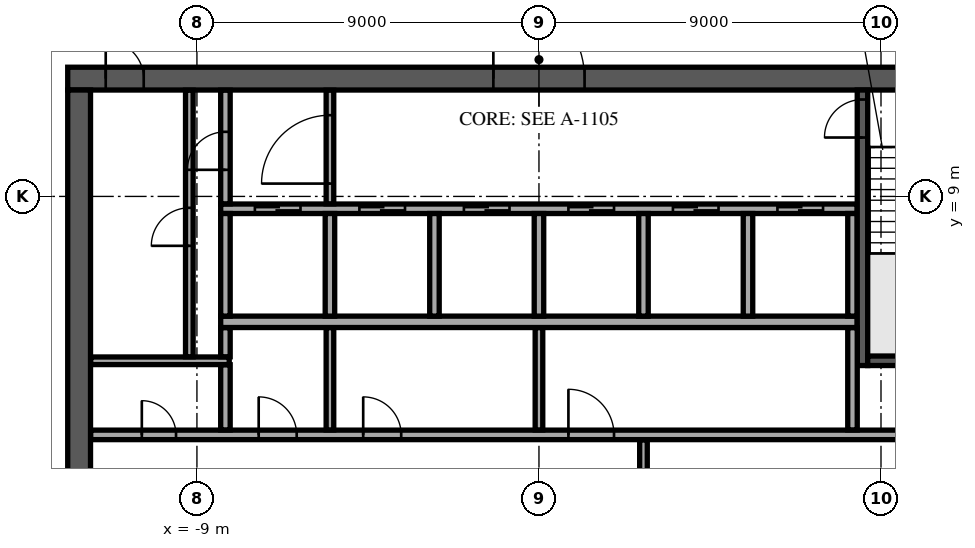
"""IFC4 building model, lengths in metres.
Left out: names, types, materials, properties, quantities, classifications, styles, units other than length and angle.
Written with IfcOpenShell. Run it as: python <this file> out.ifc"""

import sys

from ifc_helpers import new_model, si_unit, direction, frame, frame_2d, origin, place, context, subcontext, project, spatial, rectangle, extrude, element, fill, save


model = new_model("IFC4")
c1 = context("Model", 3, precision=1e-05, world=origin(), true_north=direction((0.0, 1.0)))
c2 = subcontext(c1, "Body", "Model", "MODEL_VIEW")
j1 = project(units=[si_unit("LENGTHUNIT", "METRE"), si_unit("PLANEANGLEUNIT", "RADIAN")], contexts=[c1])
p1 = place(None, origin())
s1 = spatial("IfcSite", under=j1, at=p1, CompositionType="ELEMENT")
p2 = place(p1, origin())
s2 = spatial("IfcBuilding", under=s1, at=p2, CompositionType="ELEMENT")
p3 = place(p2, frame((0.0, 0.0, 316.5)))
s3 = spatial("IfcBuildingStorey", under=s2, at=p3, CompositionType="ELEMENT", Elevation=316.5)
p4 = place(p3, frame((-12.4, 12.1, 0.0), z_axis=(0.0, 0.0, 1.0), x_axis=(1.0, 0.0, 0.0)))
e1 = element("IfcWall", 1, at=p4, inside=s3, PredefinedType="SHEAR", context=c2, shape_type="SweptSolid", body=[
    extrude(rectangle(XDim=24.8, YDim=0.6, at=frame_2d((12.4, 0.0))), origin(), (0.0, 0.0, 1.0), 3.65),
])
p5 = place(p4, frame((11.2, 0.0, 0.0)))
e2 = element("IfcOpeningElement", 2, at=p5, cuts=e1, PredefinedType="OPENING", context=c2, shape_type="SweptSolid", body=[
    extrude(rectangle(XDim=2.4, YDim=2.4, at=frame_2d((1.2, 1.2))), frame((0.0, 0.31, 0.0), z_axis=(0.0, -1.0, 0.0), x_axis=(1.0, 0.0, 0.0)), (0.0, 0.0, 1.0), 0.62),
])
p6 = place(p4, frame((22.025, 0.0, 0.0)))
e3 = element("IfcOpeningElement", 3, at=p6, cuts=e1, PredefinedType="OPENING", context=c2, shape_type="SweptSolid", body=[
    extrude(rectangle(XDim=1.2, YDim=2.1, at=frame_2d((0.6, 1.05))), frame((0.0, 0.31, 0.0), z_axis=(0.0, -1.0, 0.0), x_axis=(1.0, 0.0, 0.0)), (0.0, 0.0, 1.0), 0.62),
])
p7 = place(p4, frame((1.0, 0.0, 0.0)))
e4 = element("IfcOpeningElement", 4, at=p7, cuts=e1, PredefinedType="OPENING", context=c2, shape_type="SweptSolid", body=[
    extrude(rectangle(XDim=1.0, YDim=2.1, at=frame_2d((0.5, 1.05))), frame((0.0, 0.31, 0.0), z_axis=(0.0, -1.0, 0.0), x_axis=(1.0, 0.0, 0.0)), (0.0, 0.0, 1.0), 0.62),
])
p8 = place(p3, frame((-12.1, -11.8, 0.0), z_axis=(0.0, 0.0, 1.0), x_axis=(0.0, 1.0, 0.0)))
e5 = element("IfcWall", 5, at=p8, inside=s3, PredefinedType="SHEAR", context=c2, shape_type="SweptSolid", body=[
    extrude(rectangle(XDim=23.6, YDim=0.6, at=frame_2d((11.8, 0.0))), origin(), (0.0, 0.0, 1.0), 3.65),
])
p9 = place(p8, frame((10.6, 0.0, 0.0)))
e6 = element("IfcOpeningElement", 6, at=p9, cuts=e5, PredefinedType="OPENING", context=c2, shape_type="SweptSolid", body=[
    extrude(rectangle(XDim=2.4, YDim=2.4, at=frame_2d((1.2, 1.2))), frame((0.0, 0.31, 0.0), z_axis=(0.0, -1.0, 0.0), x_axis=(1.0, 0.0, 0.0)), (0.0, 0.0, 1.0), 0.62),
])
p10 = place(p3, frame((-8.375, 5.7, 0.0), z_axis=(0.0, 0.0, 1.0), x_axis=(1.0, 0.0, 0.0)))
e7 = element("IfcWall", 7, at=p10, inside=s3, PredefinedType="SOLIDWALL", context=c2, shape_type="SweptSolid", body=[
    extrude(rectangle(XDim=16.75, YDim=0.3, at=frame_2d((8.375, 0.0))), origin(), (0.0, 0.0, 1.0), 3.65),
])
p11 = place(p3, frame((-8.375, 8.675, 0.0), z_axis=(0.0, 0.0, 1.0), x_axis=(1.0, 0.0, 0.0)))
e8 = element("IfcWall", 8, at=p11, inside=s3, PredefinedType="SOLIDWALL", context=c2, shape_type="SweptSolid", body=[
    extrude(rectangle(XDim=16.75, YDim=0.25, at=frame_2d((8.375, 0.0))), origin(), (0.0, 0.0, 1.0), 3.65),
])
p12 = place(p11, frame((0.9, 0.0, 0.0)))
e9 = element("IfcOpeningElement", 9, at=p12, cuts=e8, PredefinedType="OPENING", context=c2, shape_type="SweptSolid", body=[
    extrude(rectangle(XDim=1.2, YDim=2.1, at=frame_2d((0.6, 1.05))), frame((0.0, 0.135, 0.0), z_axis=(0.0, -1.0, 0.0), x_axis=(1.0, 0.0, 0.0)), (0.0, 0.0, 1.0), 0.27),
])
p13 = place(p11, frame((3.65, 0.0, 0.0)))
e10 = element("IfcOpeningElement", 10, at=p13, cuts=e8, PredefinedType="OPENING", context=c2, shape_type="SweptSolid", body=[
    extrude(rectangle(XDim=1.2, YDim=2.1, at=frame_2d((0.6, 1.05))), frame((0.0, 0.135, 0.0), z_axis=(0.0, -1.0, 0.0), x_axis=(1.0, 0.0, 0.0)), (0.0, 0.0, 1.0), 0.27),
])
p14 = place(p11, frame((6.4, 0.0, 0.0)))
e11 = element("IfcOpeningElement", 11, at=p14, cuts=e8, PredefinedType="OPENING", context=c2, shape_type="SweptSolid", body=[
    extrude(rectangle(XDim=1.2, YDim=2.1, at=frame_2d((0.6, 1.05))), frame((0.0, 0.135, 0.0), z_axis=(0.0, -1.0, 0.0), x_axis=(1.0, 0.0, 0.0)), (0.0, 0.0, 1.0), 0.27),
])
p15 = place(p11, frame((9.15, 0.0, 0.0)))
e12 = element("IfcOpeningElement", 12, at=p15, cuts=e8, PredefinedType="OPENING", context=c2, shape_type="SweptSolid", body=[
    extrude(rectangle(XDim=1.2, YDim=2.1, at=frame_2d((0.6, 1.05))), frame((0.0, 0.135, 0.0), z_axis=(0.0, -1.0, 0.0), x_axis=(1.0, 0.0, 0.0)), (0.0, 0.0, 1.0), 0.27),
])
p16 = place(p11, frame((11.9, 0.0, 0.0)))
e13 = element("IfcOpeningElement", 13, at=p16, cuts=e8, PredefinedType="OPENING", context=c2, shape_type="SweptSolid", body=[
    extrude(rectangle(XDim=1.2, YDim=2.1, at=frame_2d((0.6, 1.05))), frame((0.0, 0.135, 0.0), z_axis=(0.0, -1.0, 0.0), x_axis=(1.0, 0.0, 0.0)), (0.0, 0.0, 1.0), 0.27),
])
p17 = place(p11, frame((14.65, 0.0, 0.0)))
e14 = element("IfcOpeningElement", 14, at=p17, cuts=e8, PredefinedType="OPENING", context=c2, shape_type="SweptSolid", body=[
    extrude(rectangle(XDim=1.2, YDim=2.1, at=frame_2d((0.6, 1.05))), frame((0.0, 0.135, 0.0), z_axis=(0.0, -1.0, 0.0), x_axis=(1.0, 0.0, 0.0)), (0.0, 0.0, 1.0), 0.27),
])
for number, where, z_axis, x_axis in (
    (15, (-8.25, 5.85, 0.0), (0.0, 0.0, 1.0), (0.0, 1.0, 0.0)),
    (16, (-5.5, 5.85, 0.0), (0.0, 0.0, 1.0), (0.0, 1.0, 0.0)),
    (17, (-2.75, 5.85, 0.0), (0.0, 0.0, 1.0), (0.0, 1.0, 0.0)),
    (18, (0.0, 5.85, 0.0), (0.0, 0.0, 1.0), (0.0, 1.0, 0.0)),
    (19, (2.75, 5.85, 0.0), (0.0, 0.0, 1.0), (0.0, 1.0, 0.0)),
    (20, (5.5, 5.85, 0.0), (0.0, 0.0, 1.0), (0.0, 1.0, 0.0)),
    (21, (8.25, 5.85, 0.0), (0.0, 0.0, 1.0), (0.0, 1.0, 0.0)),
):
    element("IfcWall", number, at=place(p3, frame(where, z_axis=z_axis, x_axis=x_axis)), inside=s3, PredefinedType="SOLIDWALL", context=c2, shape_type="SweptSolid", body=[
        extrude(rectangle(XDim=2.7, YDim=0.25, at=frame_2d((1.35, 0.0))), origin(), (0.0, 0.0, 1.0), 3.65),
    ])
p18 = place(p3, frame((8.512, 4.55, 0.0), z_axis=(0.0, 0.0, 1.0), x_axis=(0.0, 1.0, 0.0)))
e22 = element("IfcWall", 22, at=p18, inside=s3, PredefinedType="SOLIDWALL", context=c2, shape_type="SweptSolid", body=[
    extrude(rectangle(XDim=7.25, YDim=0.275, at=frame_2d((3.625, 0.0))), origin(), (0.0, 0.0, 1.0), 3.65),
])
p19 = place(p18, frame((6.0, 0.0, 0.0)))
e23 = element("IfcOpeningElement", 23, at=p19, cuts=e22, PredefinedType="OPENING", context=c2, shape_type="SweptSolid", body=[
    extrude(rectangle(XDim=1.0, YDim=2.1, at=frame_2d((0.5, 1.05))), frame((0.0, 0.147, 0.0), z_axis=(0.0, -1.0, 0.0), x_axis=(1.0, 0.0, 0.0)), (0.0, 0.0, 1.0), 0.295),
])
p20 = place(p3, frame((8.65, 4.675, 0.0), z_axis=(0.0, 0.0, 1.0), x_axis=(1.0, 0.0, 0.0)))
e24 = element("IfcWall", 24, at=p20, inside=s3, PredefinedType="SOLIDWALL", context=c2, shape_type="SweptSolid", body=[
    extrude(rectangle(XDim=3.15, YDim=0.25, at=frame_2d((1.575, 0.0))), origin(), (0.0, 0.0, 1.0), 3.65),
])
p21 = place(p3, frame((2.75, -2.595, 0.0), z_axis=(0.0, 0.0, 1.0), x_axis=(0.0, 1.0, 0.0)))
e25 = element("IfcWall", 25, at=p21, inside=s3, PredefinedType="PARTITIONING", context=c2, shape_type="SweptSolid", body=[
    extrude(rectangle(XDim=5.19, YDim=0.2, at=frame_2d((2.595, 0.0))), origin(), (0.0, 0.0, 1.0), 3.65),
])
p22 = place(p21, frame((1.395, 0.0, 0.0)))
e26 = element("IfcOpeningElement", 26, at=p22, cuts=e25, PredefinedType="OPENING", context=c2, shape_type="SweptSolid", body=[
    extrude(rectangle(XDim=2.4, YDim=2.4, at=frame_2d((1.2, 1.2))), frame((0.0, 0.11, 0.0), z_axis=(0.0, -1.0, 0.0), x_axis=(1.0, 0.0, 0.0)), (0.0, 0.0, 1.0), 0.22),
])
p23 = place(p3, frame((-11.795, 2.725, 0.0), z_axis=(0.0, 0.0, 1.0), x_axis=(1.0, 0.0, 0.0)))
e27 = element("IfcWall", 27, at=p23, inside=s3, PredefinedType="PARTITIONING", context=c2, shape_type="SweptSolid", body=[
    extrude(rectangle(XDim=23.59, YDim=0.25, at=frame_2d((11.795, 0.0))), origin(), (0.0, 0.0, 1.0), 3.65),
])
p24 = place(p23, frame((21.345, 0.0, 0.0)))
e28 = element("IfcOpeningElement", 28, at=p24, cuts=e27, PredefinedType="OPENING", context=c2, shape_type="SweptSolid", body=[
    extrude(rectangle(XDim=0.9, YDim=2.1, at=frame_2d((0.45, 1.05))), frame((0.0, 0.135, 0.0), z_axis=(0.0, -1.0, 0.0), x_axis=(1.0, 0.0, 0.0)), (0.0, 0.0, 1.0), 0.27),
])
p25 = place(p23, frame((1.345, 0.0, 0.0)))
e29 = element("IfcOpeningElement", 29, at=p25, cuts=e27, PredefinedType="OPENING", context=c2, shape_type="SweptSolid", body=[
    extrude(rectangle(XDim=0.9, YDim=2.1, at=frame_2d((0.45, 1.05))), frame((0.0, 0.135, 0.0), z_axis=(0.0, -1.0, 0.0), x_axis=(1.0, 0.0, 0.0)), (0.0, 0.0, 1.0), 0.27),
])
p26 = place(p23, frame((4.42, 0.0, 0.0)))
e30 = element("IfcOpeningElement", 30, at=p26, cuts=e27, PredefinedType="OPENING", context=c2, shape_type="SweptSolid", body=[
    extrude(rectangle(XDim=1.0, YDim=2.1, at=frame_2d((0.5, 1.05))), frame((0.0, 0.135, 0.0), z_axis=(0.0, -1.0, 0.0), x_axis=(1.0, 0.0, 0.0)), (0.0, 0.0, 1.0), 0.27),
])
p27 = place(p23, frame((7.17, 0.0, 0.0)))
e31 = element("IfcOpeningElement", 31, at=p27, cuts=e27, PredefinedType="OPENING", context=c2, shape_type="SweptSolid", body=[
    extrude(rectangle(XDim=1.0, YDim=2.1, at=frame_2d((0.5, 1.05))), frame((0.0, 0.135, 0.0), z_axis=(0.0, -1.0, 0.0), x_axis=(1.0, 0.0, 0.0)), (0.0, 0.0, 1.0), 0.27),
])
p28 = place(p23, frame((12.57, 0.0, 0.0)))
e32 = element("IfcOpeningElement", 32, at=p28, cuts=e27, PredefinedType="OPENING", context=c2, shape_type="SweptSolid", body=[
    extrude(rectangle(XDim=1.2, YDim=2.1, at=frame_2d((0.6, 1.05))), frame((0.0, 0.135, 0.0), z_axis=(0.0, -1.0, 0.0), x_axis=(1.0, 0.0, 0.0)), (0.0, 0.0, 1.0), 0.27),
])
p29 = place(p3, frame((-8.25, 2.855, 0.0), z_axis=(0.0, 0.0, 1.0), x_axis=(0.0, 1.0, 0.0)))
e33 = element("IfcWall", 33, at=p29, inside=s3, PredefinedType="PARTITIONING", context=c2, shape_type="SweptSolid", body=[
    extrude(rectangle(XDim=1.715, YDim=0.25, at=frame_2d((0.857, 0.0))), origin(), (0.0, 0.0, 1.0), 3.65),
])
for number, where, z_axis, x_axis in (
    (34, (-5.5, 2.855, 0.0), (0.0, 0.0, 1.0), (0.0, 1.0, 0.0)),
    (35, (0.0, 2.855, 0.0), (0.0, 0.0, 1.0), (0.0, 1.0, 0.0)),
):
    element("IfcWall", number, at=place(p3, frame(where, z_axis=z_axis, x_axis=x_axis)), inside=s3, PredefinedType="PARTITIONING", context=c2, shape_type="SweptSolid", body=[
        extrude(rectangle(XDim=2.69, YDim=0.2, at=frame_2d((1.345, 0.0))), origin(), (0.0, 0.0, 1.0), 3.65),
    ])
p30 = place(p3, frame((8.25, 2.855, 0.0), z_axis=(0.0, 0.0, 1.0), x_axis=(0.0, 1.0, 0.0)))
e36 = element("IfcWall", 36, at=p30, inside=s3, PredefinedType="PARTITIONING", context=c2, shape_type="SweptSolid", body=[
    extrude(rectangle(XDim=2.69, YDim=0.25, at=frame_2d((1.345, 0.0))), origin(), (0.0, 0.0, 1.0), 3.65),
])
p31 = place(p3, frame((-11.795, 4.675, 0.0), z_axis=(0.0, 0.0, 1.0), x_axis=(1.0, 0.0, 0.0)))
e37 = element("IfcWall", 37, at=p31, inside=s3, PredefinedType="PARTITIONING", context=c2, shape_type="SweptSolid", body=[
    extrude(rectangle(XDim=3.645, YDim=0.2, at=frame_2d((1.823, 0.0))), origin(), (0.0, 0.0, 1.0), 3.65),
])
p32 = place(p3, frame((-9.2, 4.78, 0.0), z_axis=(0.0, 0.0, 1.0), x_axis=(0.0, 1.0, 0.0)))
e38 = element("IfcWall", 38, at=p32, inside=s3, PredefinedType="PARTITIONING", context=c2, shape_type="SweptSolid", body=[
    extrude(rectangle(XDim=7.015, YDim=0.2, at=frame_2d((3.507, 0.0))), origin(), (0.0, 0.0, 1.0), 3.65),
])
p33 = place(p32, frame((2.92, 0.0, 0.0)))
e39 = element("IfcOpeningElement", 39, at=p33, cuts=e38, PredefinedType="OPENING", context=c2, shape_type="SweptSolid", body=[
    extrude(rectangle(XDim=1.0, YDim=2.1, at=frame_2d((0.5, 1.05))), frame((0.0, 0.11, 0.0), z_axis=(0.0, -1.0, 0.0), x_axis=(1.0, 0.0, 0.0)), (0.0, 0.0, 1.0), 0.22),
])
p34 = place(p3, frame((-8.25, 4.78, 0.0), z_axis=(0.0, 0.0, 1.0), x_axis=(0.0, 1.0, 0.0)))
e40 = element("IfcWall", 40, at=p34, inside=s3, PredefinedType="PARTITIONING", context=c2, shape_type="SweptSolid", body=[
    extrude(rectangle(XDim=0.765, YDim=0.25, at=frame_2d((0.382, 0.0))), origin(), (0.0, 0.0, 1.0), 3.65),
])
p35 = place(p3, frame((-8.25, 8.805, 0.0), z_axis=(0.0, 0.0, 1.0), x_axis=(0.0, 1.0, 0.0)))
e41 = element("IfcWall", 41, at=p35, inside=s3, PredefinedType="PARTITIONING", context=c2, shape_type="SweptSolid", body=[
    extrude(rectangle(XDim=2.99, YDim=0.25, at=frame_2d((1.495, 0.0))), origin(), (0.0, 0.0, 1.0), 3.65),
])
p36 = place(p35, frame((0.895, 0.0, 0.0)))
e42 = element("IfcOpeningElement", 42, at=p36, cuts=e41, PredefinedType="OPENING", context=c2, shape_type="SweptSolid", body=[
    extrude(rectangle(XDim=1.0, YDim=2.1, at=frame_2d((0.5, 1.05))), frame((0.0, 0.135, 0.0), z_axis=(0.0, -1.0, 0.0), x_axis=(1.0, 0.0, 0.0)), (0.0, 0.0, 1.0), 0.27),
])
p37 = place(p3, frame((-5.5, 8.805, 0.0), z_axis=(0.0, 0.0, 1.0), x_axis=(0.0, 1.0, 0.0)))
e43 = element("IfcWall", 43, at=p37, inside=s3, PredefinedType="PARTITIONING", context=c2, shape_type="SweptSolid", body=[
    extrude(rectangle(XDim=2.99, YDim=0.2, at=frame_2d((1.495, 0.0))), origin(), (0.0, 0.0, 1.0), 3.65),
])
p38 = place(p37, frame((0.532, 0.0, 0.0)))
e44 = element("IfcOpeningElement", 44, at=p38, cuts=e43, PredefinedType="OPENING", context=c2, shape_type="SweptSolid", body=[
    extrude(rectangle(XDim=1.8, YDim=2.1, at=frame_2d((0.9, 1.05))), frame((0.0, 0.11, 0.0), z_axis=(0.0, -1.0, 0.0), x_axis=(1.0, 0.0, 0.0)), (0.0, 0.0, 1.0), 0.22),
])
p39 = place(p3, frame((-10.964, 23.635, 0.0), z_axis=(0.0, 0.0, 1.0), x_axis=(0.951055018443, -0.309021604252, 0.0)))
e45 = element("IfcWall", 45, at=p39, inside=s3, PredefinedType="PARTITIONING", context=c2, shape_type="SweptSolid", body=[
    extrude(rectangle(XDim=35.537, YDim=0.15, at=frame_2d((17.769, 0.0))), origin(), (0.0, 0.0, 1.0), 3.25),
])
p40 = place(p39, frame((9.554, 0.0, 0.0)))
e46 = element("IfcOpeningElement", 46, at=p40, cuts=e45, PredefinedType="OPENING", context=c2, shape_type="SweptSolid", body=[
    extrude(rectangle(XDim=1.0, YDim=2.1, at=frame_2d((0.5, 1.05))), frame((0.0, 0.085, 0.0), z_axis=(0.0, -1.0, 0.0), x_axis=(1.0, 0.0, 0.0)), (0.0, 0.0, 1.0), 0.17),
])
p41 = place(p39, frame((14.629, 0.0, 0.0)))
e47 = element("IfcOpeningElement", 47, at=p41, cuts=e45, PredefinedType="OPENING", context=c2, shape_type="SweptSolid", body=[
    extrude(rectangle(XDim=1.0, YDim=2.1, at=frame_2d((0.5, 1.05))), frame((0.0, 0.085, 0.0), z_axis=(0.0, -1.0, 0.0), x_axis=(1.0, 0.0, 0.0)), (0.0, 0.0, 1.0), 0.17),
])
p42 = place(p39, frame((27.287, 0.0, 0.0)))
e48 = element("IfcOpeningElement", 48, at=p42, cuts=e45, PredefinedType="OPENING", context=c2, shape_type="SweptSolid", body=[
    extrude(rectangle(XDim=1.0, YDim=2.1, at=frame_2d((0.5, 1.05))), frame((0.0, 0.085, 0.0), z_axis=(0.0, -1.0, 0.0), x_axis=(1.0, 0.0, 0.0)), (0.0, 0.0, 1.0), 0.17),
])
p43 = place(p39, frame((29.988, 0.0, 0.0)))
e49 = element("IfcOpeningElement", 49, at=p43, cuts=e45, PredefinedType="OPENING", context=c2, shape_type="SweptSolid", body=[
    extrude(rectangle(XDim=1.8, YDim=2.1, at=frame_2d((0.9, 1.05))), frame((0.0, 0.085, 0.0), z_axis=(0.0, -1.0, 0.0), x_axis=(1.0, 0.0, 0.0)), (0.0, 0.0, 1.0), 0.17),
])
p44 = place(p5, origin())
e50 = element("IfcDoor", 50, at=p44, inside=s3, OperationType="SINGLE_SWING_LEFT", PredefinedType="DOOR", context=c2, shape_type="SweptSolid", body=[
    extrude(rectangle(XDim=2.4, YDim=2.4, at=frame_2d((1.2, 1.2))), frame((0.0, 0.025, 0.0), z_axis=(0.0, -1.0, 0.0), x_axis=(1.0, 0.0, 0.0)), (0.0, 0.0, 1.0), 0.05),
])
fill(e2, e50)
p45 = place(p7, origin())
e51 = element("IfcDoor", 51, at=p45, inside=s3, OperationType="SINGLE_SWING_LEFT", PredefinedType="DOOR", context=c2, shape_type="SweptSolid", body=[
    extrude(rectangle(XDim=1.0, YDim=2.1, at=frame_2d((0.5, 1.05))), frame((0.0, 0.025, 0.0), z_axis=(0.0, -1.0, 0.0), x_axis=(1.0, 0.0, 0.0)), (0.0, 0.0, 1.0), 0.05),
])
fill(e4, e51)
p46 = place(p12, origin())
e52 = element("IfcDoor", 52, at=p46, inside=s3, OperationType="DOUBLE_DOOR_SLIDING", PredefinedType="DOOR", context=c2, shape_type="SweptSolid", body=[
    extrude(rectangle(XDim=1.2, YDim=2.1, at=frame_2d((0.6, 1.05))), frame((0.0, 0.025, 0.0), z_axis=(0.0, -1.0, 0.0), x_axis=(1.0, 0.0, 0.0)), (0.0, 0.0, 1.0), 0.05),
])
fill(e9, e52)
p47 = place(p13, origin())
e53 = element("IfcDoor", 53, at=p47, inside=s3, OperationType="DOUBLE_DOOR_SLIDING", PredefinedType="DOOR", context=c2, shape_type="SweptSolid", body=[
    extrude(rectangle(XDim=1.2, YDim=2.1, at=frame_2d((0.6, 1.05))), frame((0.0, 0.025, 0.0), z_axis=(0.0, -1.0, 0.0), x_axis=(1.0, 0.0, 0.0)), (0.0, 0.0, 1.0), 0.05),
])
fill(e10, e53)
p48 = place(p14, origin())
e54 = element("IfcDoor", 54, at=p48, inside=s3, OperationType="DOUBLE_DOOR_SLIDING", PredefinedType="DOOR", context=c2, shape_type="SweptSolid", body=[
    extrude(rectangle(XDim=1.2, YDim=2.1, at=frame_2d((0.6, 1.05))), frame((0.0, 0.025, 0.0), z_axis=(0.0, -1.0, 0.0), x_axis=(1.0, 0.0, 0.0)), (0.0, 0.0, 1.0), 0.05),
])
fill(e11, e54)
p49 = place(p15, origin())
e55 = element("IfcDoor", 55, at=p49, inside=s3, OperationType="DOUBLE_DOOR_SLIDING", PredefinedType="DOOR", context=c2, shape_type="SweptSolid", body=[
    extrude(rectangle(XDim=1.2, YDim=2.1, at=frame_2d((0.6, 1.05))), frame((0.0, 0.025, 0.0), z_axis=(0.0, -1.0, 0.0), x_axis=(1.0, 0.0, 0.0)), (0.0, 0.0, 1.0), 0.05),
])
fill(e12, e55)
p50 = place(p16, origin())
e56 = element("IfcDoor", 56, at=p50, inside=s3, OperationType="DOUBLE_DOOR_SLIDING", PredefinedType="DOOR", context=c2, shape_type="SweptSolid", body=[
    extrude(rectangle(XDim=1.2, YDim=2.1, at=frame_2d((0.6, 1.05))), frame((0.0, 0.025, 0.0), z_axis=(0.0, -1.0, 0.0), x_axis=(1.0, 0.0, 0.0)), (0.0, 0.0, 1.0), 0.05),
])
fill(e13, e56)
p51 = place(p17, origin())
e57 = element("IfcDoor", 57, at=p51, inside=s3, OperationType="DOUBLE_DOOR_SLIDING", PredefinedType="DOOR", context=c2, shape_type="SweptSolid", body=[
    extrude(rectangle(XDim=1.2, YDim=2.1, at=frame_2d((0.6, 1.05))), frame((0.0, 0.025, 0.0), z_axis=(0.0, -1.0, 0.0), x_axis=(1.0, 0.0, 0.0)), (0.0, 0.0, 1.0), 0.05),
])
fill(e14, e57)
p52 = place(p19, origin())
e58 = element("IfcDoor", 58, at=p52, inside=s3, OperationType="SINGLE_SWING_LEFT", PredefinedType="DOOR", context=c2, shape_type="SweptSolid", body=[
    extrude(rectangle(XDim=1.0, YDim=2.1, at=frame_2d((0.5, 1.05))), frame((0.0, 0.025, 0.0), z_axis=(0.0, -1.0, 0.0), x_axis=(1.0, 0.0, 0.0)), (0.0, 0.0, 1.0), 0.05),
])
fill(e23, e58)
p53 = place(p25, origin())
e59 = element("IfcDoor", 59, at=p53, inside=s3, OperationType="SINGLE_SWING_RIGHT", PredefinedType="DOOR", context=c2, shape_type="SweptSolid", body=[
    extrude(rectangle(XDim=0.9, YDim=2.1, at=frame_2d((0.45, 1.05))), frame((0.0, 0.025, 0.0), z_axis=(0.0, -1.0, 0.0), x_axis=(1.0, 0.0, 0.0)), (0.0, 0.0, 1.0), 0.05),
])
fill(e29, e59)
p54 = place(p33, origin())
e60 = element("IfcDoor", 60, at=p54, inside=s3, OperationType="SINGLE_SWING_RIGHT", PredefinedType="DOOR", context=c2, shape_type="SweptSolid", body=[
    extrude(rectangle(XDim=1.0, YDim=2.1, at=frame_2d((0.5, 1.05))), frame((0.0, 0.025, 0.0), z_axis=(0.0, -1.0, 0.0), x_axis=(1.0, 0.0, 0.0)), (0.0, 0.0, 1.0), 0.05),
])
fill(e39, e60)
p55 = place(p36, origin())
e61 = element("IfcDoor", 61, at=p55, inside=s3, OperationType="SINGLE_SWING_RIGHT", PredefinedType="DOOR", context=c2, shape_type="SweptSolid", body=[
    extrude(rectangle(XDim=1.0, YDim=2.1, at=frame_2d((0.5, 1.05))), frame((0.0, 0.025, 0.0), z_axis=(0.0, -1.0, 0.0), x_axis=(1.0, 0.0, 0.0)), (0.0, 0.0, 1.0), 0.05),
])
fill(e42, e61)
p56 = place(p26, origin())
e62 = element("IfcDoor", 62, at=p56, inside=s3, OperationType="SINGLE_SWING_RIGHT", PredefinedType="DOOR", context=c2, shape_type="SweptSolid", body=[
    extrude(rectangle(XDim=1.0, YDim=2.1, at=frame_2d((0.5, 1.05))), frame((0.0, 0.025, 0.0), z_axis=(0.0, -1.0, 0.0), x_axis=(1.0, 0.0, 0.0)), (0.0, 0.0, 1.0), 0.05),
])
fill(e30, e62)
p57 = place(p27, origin())
e63 = element("IfcDoor", 63, at=p57, inside=s3, OperationType="SINGLE_SWING_RIGHT", PredefinedType="DOOR", context=c2, shape_type="SweptSolid", body=[
    extrude(rectangle(XDim=1.0, YDim=2.1, at=frame_2d((0.5, 1.05))), frame((0.0, 0.025, 0.0), z_axis=(0.0, -1.0, 0.0), x_axis=(1.0, 0.0, 0.0)), (0.0, 0.0, 1.0), 0.05),
])
fill(e31, e63)
p58 = place(p28, origin())
e64 = element("IfcDoor", 64, at=p58, inside=s3, OperationType="SINGLE_SWING_LEFT", PredefinedType="DOOR", context=c2, shape_type="SweptSolid", body=[
    extrude(rectangle(XDim=1.2, YDim=2.1, at=frame_2d((0.6, 1.05))), frame((0.0, 0.025, 0.0), z_axis=(0.0, -1.0, 0.0), x_axis=(1.0, 0.0, 0.0)), (0.0, 0.0, 1.0), 0.05),
])
fill(e32, e64)
p59 = place(p38, origin())
e65 = element("IfcDoor", 65, at=p59, inside=s3, OperationType="SINGLE_SWING_LEFT", PredefinedType="DOOR", context=c2, shape_type="SweptSolid", body=[
    extrude(rectangle(XDim=1.8, YDim=2.1, at=frame_2d((0.9, 1.05))), frame((0.0, 0.025, 0.0), z_axis=(0.0, -1.0, 0.0), x_axis=(1.0, 0.0, 0.0)), (0.0, 0.0, 1.0), 0.05),
])
fill(e44, e65)
save(model, sys.argv[1])
